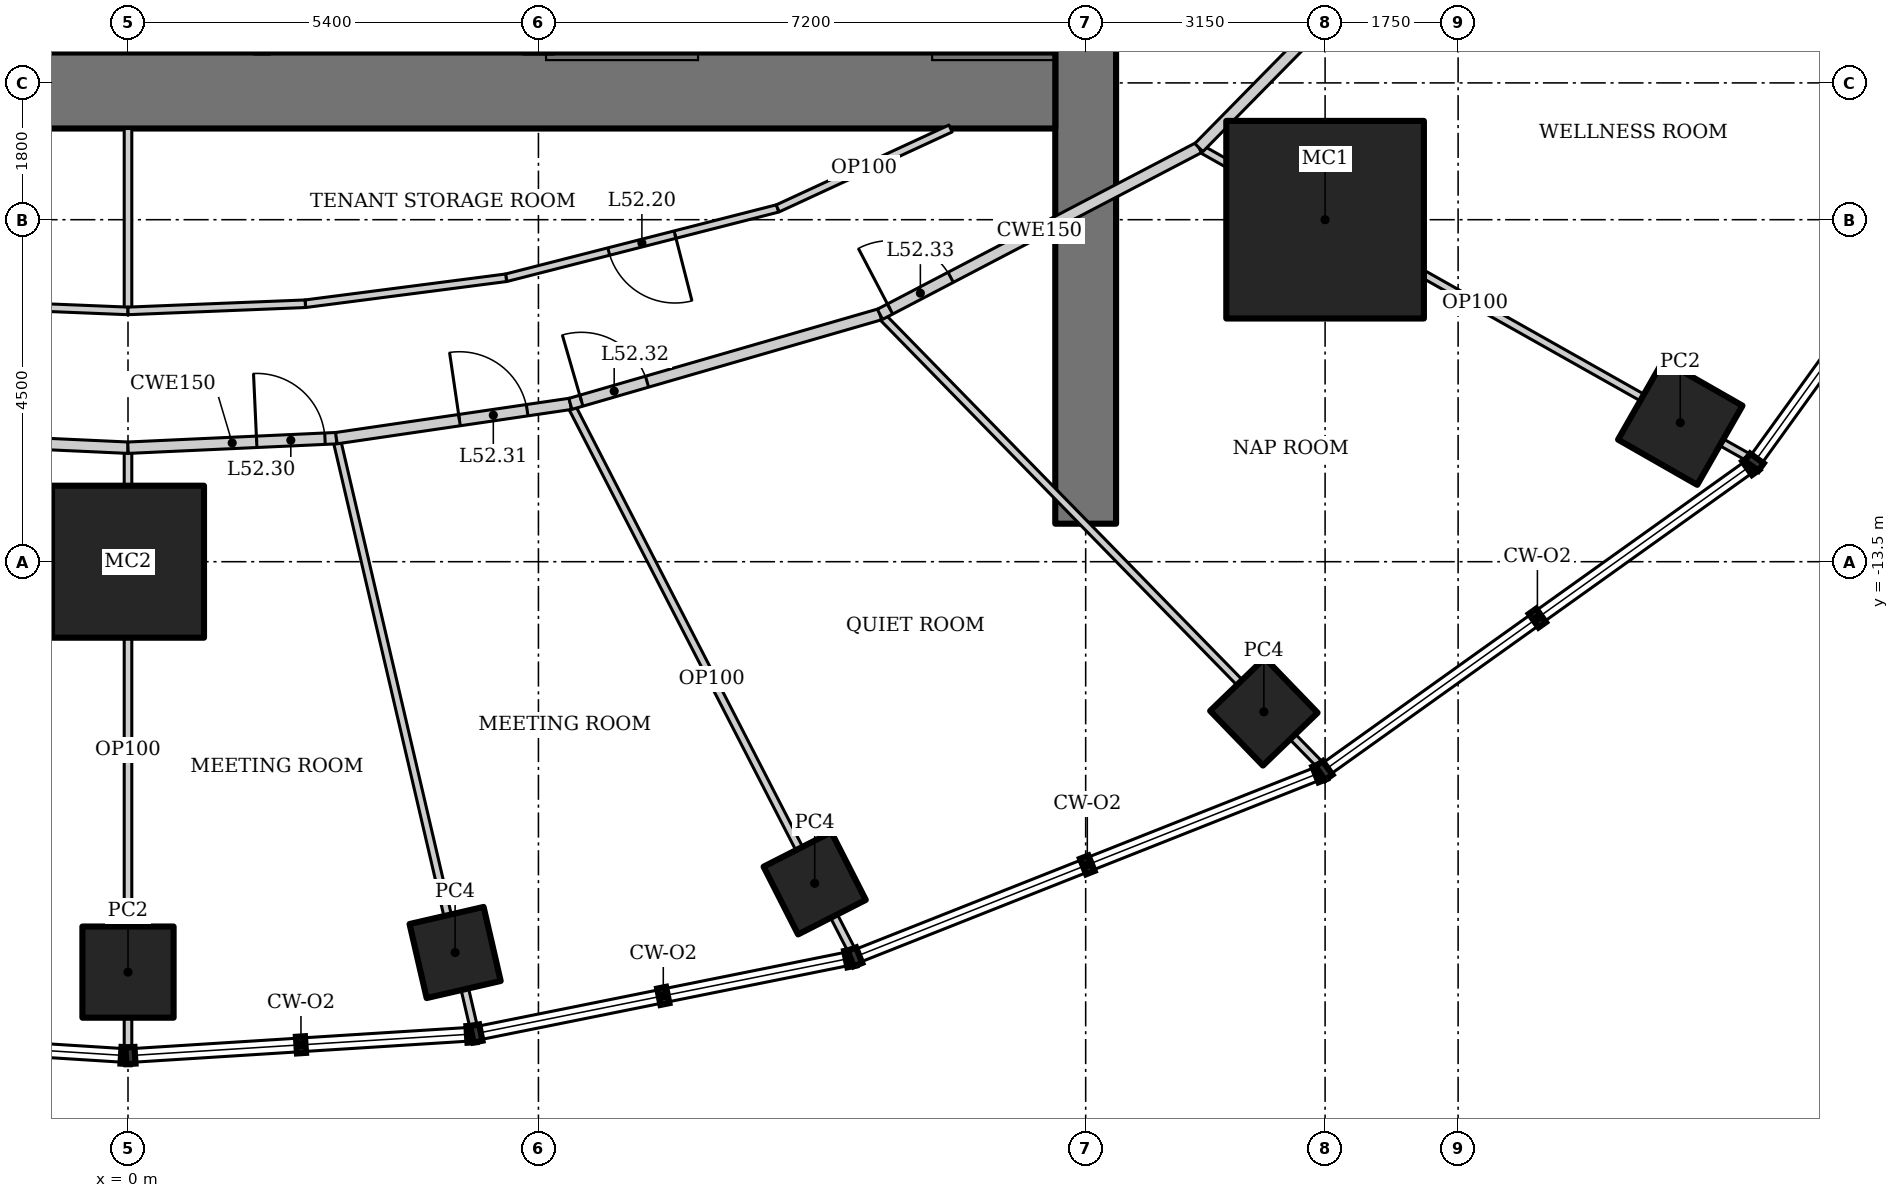
"""IFC4 building model, lengths in metres.
Left out: names, types, materials, properties, quantities, classifications, styles, units other than length and angle.
Written with IfcOpenShell. Run it as: python <this file> out.ifc"""

import sys

from ifc_helpers import new_model, si_unit, direction, frame, frame_2d, origin, origin_2d, place, context, subcontext, project, spatial, rectangle, hollow_rectangle, extrude, element, fill, save


model = new_model("IFC4")
c1 = context("Model", 3, precision=1e-05, world=origin(), true_north=direction((0.0, 1.0)))
c2 = subcontext(c1, "Body", "Model", "MODEL_VIEW")
j1 = project(units=[si_unit("LENGTHUNIT", "METRE"), si_unit("PLANEANGLEUNIT", "RADIAN")], contexts=[c1])
p1 = place(None, origin())
s1 = spatial("IfcSite", under=j1, at=p1, CompositionType="ELEMENT")
p2 = place(p1, origin())
s2 = spatial("IfcBuilding", under=s1, at=p2, CompositionType="ELEMENT")
p3 = place(p2, frame((0.0, 0.0, 224.2)))
s3 = spatial("IfcBuildingStorey", under=s2, at=p3, CompositionType="ELEMENT", Elevation=224.2)
p4 = place(p3, frame((0.0, -13.5, 0.0), z_axis=(0.0, 0.0, 1.0), x_axis=(1.0, 0.0, 0.0)))
e1 = element("IfcColumn", 1, at=p4, inside=s3, PredefinedType="COLUMN", context=c2, shape_type="SweptSolid", body=[
    extrude(hollow_rectangle(XDim=2.0, YDim=2.0, WallThickness=0.17, at=origin_2d()), origin(), (0.0, 0.0, 1.0), 4.2),
])
p5 = place(p3, frame((15.75, -9.0, 0.0), z_axis=(0.0, 0.0, 1.0), x_axis=(1.0, 0.0, 0.0)))
e2 = element("IfcColumn", 2, at=p5, inside=s3, PredefinedType="COLUMN", context=c2, shape_type="SweptSolid", body=[
    extrude(hollow_rectangle(XDim=2.6, YDim=2.6, WallThickness=0.13, at=origin_2d()), origin(), (0.0, 0.0, 1.0), 4.2),
])
p6 = place(p3, frame((0.0, -18.9, 0.0), z_axis=(0.0, 0.0, 1.0), x_axis=(1.0, 0.0, 0.0)))
e3 = element("IfcColumn", 3, at=p6, inside=s3, PredefinedType="COLUMN", context=c2, shape_type="SweptSolid", body=[
    extrude(hollow_rectangle(XDim=1.2, YDim=1.2, WallThickness=0.1, at=origin_2d()), origin(), (0.0, 0.0, 1.0), 4.2),
])
for number, where, z_axis, x_axis in (
    (4, (4.304, -18.642, 0.0), (0.0, 0.0, 1.0), (0.974, 0.225, 0.0)),
    (5, (9.035, -17.731, 0.0), (0.0, 0.0, 1.0), (0.891, 0.454, 0.0)),
    (6, (14.944, -15.475, 0.0), (0.0, 0.0, 1.0), (0.719, 0.695, 0.0)),
):
    element("IfcColumn", number, at=place(p3, frame(where, z_axis=z_axis, x_axis=x_axis)), inside=s3, PredefinedType="COLUMN", context=c2, shape_type="SweptSolid", body=[
        extrude(hollow_rectangle(XDim=1.0, YDim=1.0, WallThickness=0.08, at=origin_2d()), origin(), (0.0, 0.0, 1.0), 4.2),
    ])
p7 = place(p3, frame((20.423, -11.67, 0.0), z_axis=(0.0, 0.0, 1.0), x_axis=(0.496139221777, 0.86824298017, 0.0)))
e7 = element("IfcColumn", 7, at=p7, inside=s3, PredefinedType="COLUMN", context=c2, shape_type="SweptSolid", body=[
    extrude(hollow_rectangle(XDim=1.2, YDim=1.2, WallThickness=0.1, at=origin_2d()), origin(), (0.0, 0.0, 1.0), 4.2),
])
p8 = place(p3, frame((12.6, -13.0, 0.0), z_axis=(0.0, 0.0, 1.0), x_axis=(0.0, 1.0, 0.0)))
e8 = element("IfcWall", 8, at=p8, inside=s3, PredefinedType="SHEAR", context=c2, shape_type="SweptSolid", body=[
    extrude(rectangle(XDim=26.0, YDim=0.8, at=frame_2d((13.0, 0.0))), origin(), (0.0, 0.0, 1.0), 4.2),
])
p9 = place(p8, frame((12.1, 0.0, 0.0)))
e9 = element("IfcOpeningElement", 9, at=p9, cuts=e8, PredefinedType="OPENING", context=c2, shape_type="SweptSolid", body=[
    extrude(rectangle(XDim=1.8, YDim=2.1, at=frame_2d((0.9, 1.05))), frame((0.0, 0.41, 0.0), z_axis=(0.0, -1.0, 0.0), x_axis=(1.0, 0.0, 0.0)), (0.0, 0.0, 1.0), 0.82),
])
p10 = place(p3, frame((-12.2, -7.3, 0.0), z_axis=(0.0, 0.0, 1.0), x_axis=(1.0, 0.0, 0.0)))
e10 = element("IfcWall", 10, at=p10, inside=s3, PredefinedType="SHEAR", context=c2, shape_type="SweptSolid", body=[
    extrude(rectangle(XDim=24.4, YDim=1.0, at=frame_2d((12.2, 0.0))), origin(), (0.0, 0.0, 1.0), 4.2),
])
p11 = place(p3, frame((1.767, -2.6, 0.0), z_axis=(0.0, 0.0, 1.0), x_axis=(0.0, -1.0, 0.0)))
e11 = element("IfcWall", 11, at=p11, inside=s3, PredefinedType="SOLIDWALL", context=c2, shape_type="SweptSolid", body=[
    extrude(rectangle(XDim=4.2, YDim=0.2, at=frame_2d((2.1, 0.0))), origin(), (0.0, 0.0, 1.0), 4.2),
])
p12 = place(p3, frame((0.0, -19.945, 0.0), z_axis=(0.0, 0.0, 1.0), x_axis=(0.0, 1.0, 0.0)))
e12 = element("IfcWall", 12, at=p12, inside=s3, PredefinedType="PARTITIONING", context=c2, shape_type="SweptSolid", body=[
    extrude(rectangle(XDim=7.945, YDim=0.1, at=frame_2d((3.972, 0.0))), origin(), (0.0, 0.0, 1.0), 3.644),
])
p13 = place(p3, frame((4.556, -19.657, 0.0), z_axis=(0.0, 0.0, 1.0), x_axis=(-0.227034513848, 0.973886712879, 0.0)))
e13 = element("IfcWall", 13, at=p13, inside=s3, PredefinedType="PARTITIONING", context=c2, shape_type="SweptSolid", body=[
    extrude(rectangle(XDim=7.991, YDim=0.1, at=frame_2d((3.996, 0.0))), origin(), (0.0, 0.0, 1.0), 3.293),
])
p14 = place(p3, frame((9.539, -18.65, 0.0), z_axis=(0.0, 0.0, 1.0), x_axis=(-0.457552286462, 0.88918271753, 0.0)))
e14 = element("IfcWall", 14, at=p14, inside=s3, PredefinedType="PARTITIONING", context=c2, shape_type="SweptSolid", body=[
    extrude(rectangle(XDim=8.128, YDim=0.1, at=frame_2d((4.064, 0.0))), origin(), (0.0, 0.0, 1.0), 3.293),
])
p15 = place(p3, frame((15.709, -16.199, 0.0), z_axis=(0.0, 0.0, 1.0), x_axis=(-0.69875697861, 0.715359129978, 0.0)))
e15 = element("IfcWall", 15, at=p15, inside=s3, PredefinedType="PARTITIONING", context=c2, shape_type="SweptSolid", body=[
    extrude(rectangle(XDim=8.323, YDim=0.1, at=frame_2d((4.162, 0.0))), origin(), (0.0, 0.0, 1.0), 3.41),
])
p16 = place(p3, frame((21.358, -12.15, 0.0), z_axis=(0.0, 0.0, 1.0), x_axis=(-0.871080529249, 0.491140215786, 0.0)))
e16 = element("IfcWall", 16, at=p16, inside=s3, PredefinedType="PARTITIONING", context=c2, shape_type="SweptSolid", body=[
    extrude(rectangle(XDim=8.345, YDim=0.1, at=frame_2d((4.173, 0.0))), origin(), (0.0, 0.0, 1.0), 3.522),
])
p17 = place(p3, frame((-2.741, -11.875, 0.0), z_axis=(0.0, 0.0, 1.0), x_axis=(0.998953998629, -0.045726454297, 0.0)))
e17 = element("IfcWall", 17, at=p17, inside=s3, PredefinedType="PARTITIONING", context=c2, shape_type="SweptSolid", body=[
    extrude(rectangle(XDim=2.744, YDim=0.15, at=frame_2d((1.372, 0.0))), origin(), (0.0, 0.0, 1.0), 4.05),
])
p18 = place(p3, frame((0.0, -12.0, 0.0), z_axis=(0.0, 0.0, 1.0), x_axis=(0.998953998629, 0.045726454297, 0.0)))
e18 = element("IfcWall", 18, at=p18, inside=s3, PredefinedType="PARTITIONING", context=c2, shape_type="SweptSolid", body=[
    extrude(rectangle(XDim=2.744, YDim=0.15, at=frame_2d((1.372, 0.0))), origin(), (0.0, 0.0, 1.0), 4.05),
])
p19 = place(p18, frame((1.694, 0.0, 0.0)))
e19 = element("IfcOpeningElement", 19, at=p19, cuts=e18, PredefinedType="OPENING", context=c2, shape_type="SweptSolid", body=[
    extrude(rectangle(XDim=0.9, YDim=2.1, at=frame_2d((0.45, 1.05))), frame((0.0, 0.085, 0.0), z_axis=(0.0, -1.0, 0.0), x_axis=(1.0, 0.0, 0.0)), (0.0, 0.0, 1.0), 0.17),
])
p20 = place(p3, frame((2.741, -11.875, 0.0), z_axis=(0.0, 0.0, 1.0), x_axis=(0.989421822189, 0.145067080265, 0.0)))
e20 = element("IfcWall", 20, at=p20, inside=s3, PredefinedType="PARTITIONING", context=c2, shape_type="SweptSolid", body=[
    extrude(rectangle(XDim=3.112, YDim=0.15, at=frame_2d((1.556, 0.0))), origin(), (0.0, 0.0, 1.0), 4.05),
])
p21 = place(p20, frame((1.637, 0.0, 0.0)))
e21 = element("IfcOpeningElement", 21, at=p21, cuts=e20, PredefinedType="OPENING", context=c2, shape_type="SweptSolid", body=[
    extrude(rectangle(XDim=0.9, YDim=2.1, at=frame_2d((0.45, 1.05))), frame((0.0, 0.085, 0.0), z_axis=(0.0, -1.0, 0.0), x_axis=(1.0, 0.0, 0.0)), (0.0, 0.0, 1.0), 0.17),
])
p22 = place(p3, frame((5.82, -11.423, 0.0), z_axis=(0.0, 0.0, 1.0), x_axis=(0.960614838378, 0.27788330696, 0.0)))
e22 = element("IfcWall", 22, at=p22, inside=s3, PredefinedType="PARTITIONING", context=c2, shape_type="SweptSolid", body=[
    extrude(rectangle(XDim=4.24, YDim=0.15, at=frame_2d((2.12, 0.0))), origin(), (0.0, 0.0, 1.0), 4.05),
])
p23 = place(p22, frame((0.15, 0.0, 0.0)))
e23 = element("IfcOpeningElement", 23, at=p23, cuts=e22, PredefinedType="OPENING", context=c2, shape_type="SweptSolid", body=[
    extrude(rectangle(XDim=0.9, YDim=2.1, at=frame_2d((0.45, 1.05))), frame((0.0, 0.085, 0.0), z_axis=(0.0, -1.0, 0.0), x_axis=(1.0, 0.0, 0.0)), (0.0, 0.0, 1.0), 0.17),
])
p24 = place(p3, frame((9.893, -10.245, 0.0), z_axis=(0.0, 0.0, 1.0), x_axis=(0.886174439647, 0.463351769735, 0.0)))
e24 = element("IfcWall", 24, at=p24, inside=s3, PredefinedType="PARTITIONING", context=c2, shape_type="SweptSolid", body=[
    extrude(rectangle(XDim=4.735, YDim=0.15, at=frame_2d((2.367, 0.0))), origin(), (0.0, 0.0, 1.0), 4.05),
])
p25 = place(p24, frame((0.15, 0.0, 0.0)))
e25 = element("IfcOpeningElement", 25, at=p25, cuts=e24, PredefinedType="OPENING", context=c2, shape_type="SweptSolid", body=[
    extrude(rectangle(XDim=0.9, YDim=2.1, at=frame_2d((0.45, 1.05))), frame((0.0, 0.085, 0.0), z_axis=(0.0, -1.0, 0.0), x_axis=(1.0, 0.0, 0.0)), (0.0, 0.0, 1.0), 0.17),
])
p26 = place(p3, frame((14.089, -8.051, 0.0), z_axis=(0.0, 0.0, 1.0), x_axis=(0.701111216625, 0.713051934941, 0.0)))
e26 = element("IfcWall", 26, at=p26, inside=s3, PredefinedType="PARTITIONING", context=c2, shape_type="SweptSolid", body=[
    extrude(rectangle(XDim=5.112, YDim=0.15, at=frame_2d((2.556, 0.0))), origin(), (0.0, 0.0, 1.0), 4.05),
])
p27 = place(p26, frame((4.061, 0.0, 0.0)))
e27 = element("IfcOpeningElement", 27, at=p27, cuts=e26, PredefinedType="OPENING", context=c2, shape_type="SweptSolid", body=[
    extrude(rectangle(XDim=0.9, YDim=2.1, at=frame_2d((0.45, 1.05))), frame((0.0, 0.085, 0.0), z_axis=(0.0, -1.0, 0.0), x_axis=(1.0, 0.0, 0.0)), (0.0, 0.0, 1.0), 0.17),
])
p28 = place(p3, frame((0.0, -7.8, 0.0), z_axis=(0.0, 0.0, 1.0), x_axis=(0.0, -1.0, 0.0)))
e28 = element("IfcWall", 28, at=p28, inside=s3, PredefinedType="PARTITIONING", context=c2, shape_type="SweptSolid", body=[
    extrude(rectangle(XDim=2.4, YDim=0.1, at=frame_2d((1.2, 0.0))), origin(), (0.0, 0.0, 1.0), 3.644),
])
p29 = place(p3, frame((0.0, -10.2, 0.0), z_axis=(0.0, 0.0, 1.0), x_axis=(-0.999185180766, 0.040360556695, 0.0)))
e29 = element("IfcWall", 29, at=p29, inside=s3, PredefinedType="PARTITIONING", context=c2, shape_type="SweptSolid", body=[
    extrude(rectangle(XDim=2.335, YDim=0.1, at=frame_2d((1.167, 0.0))), origin(), (0.0, 0.0, 1.0), 4.05),
])
p30 = place(p3, frame((8.548, -8.851, 0.0), z_axis=(0.0, 0.0, 1.0), x_axis=(-0.968887312542, -0.247502273921, 0.0)))
e30 = element("IfcWall", 30, at=p30, inside=s3, PredefinedType="PARTITIONING", context=c2, shape_type="SweptSolid", body=[
    extrude(rectangle(XDim=3.687, YDim=0.1, at=frame_2d((1.844, 0.0))), origin(), (0.0, 0.0, 1.0), 4.05),
])
p31 = place(p30, frame((1.394, 0.0, 0.0)))
e31 = element("IfcOpeningElement", 31, at=p31, cuts=e30, PredefinedType="OPENING", context=c2, shape_type="SweptSolid", body=[
    extrude(rectangle(XDim=0.9, YDim=2.1, at=frame_2d((0.45, 1.05))), frame((0.0, 0.06, 0.0), z_axis=(0.0, -1.0, 0.0), x_axis=(1.0, 0.0, 0.0)), (0.0, 0.0, 1.0), 0.12),
])
p32 = place(p3, frame((4.975, -9.764, 0.0), z_axis=(0.0, 0.0, 1.0), x_axis=(-0.99173579163, -0.128296997624, 0.0)))
e32 = element("IfcWall", 32, at=p32, inside=s3, PredefinedType="PARTITIONING", context=c2, shape_type="SweptSolid", body=[
    extrude(rectangle(XDim=2.664, YDim=0.1, at=frame_2d((1.332, 0.0))), origin(), (0.0, 0.0, 1.0), 4.05),
])
p33 = place(p3, frame((2.333, -10.106, 0.0), z_axis=(0.0, 0.0, 1.0), x_axis=(-0.999185180766, -0.040360556695, 0.0)))
e33 = element("IfcWall", 33, at=p33, inside=s3, PredefinedType="PARTITIONING", context=c2, shape_type="SweptSolid", body=[
    extrude(rectangle(XDim=2.335, YDim=0.1, at=frame_2d((1.167, 0.0))), origin(), (0.0, 0.0, 1.0), 4.05),
])
p34 = place(p3, frame((10.823, -7.8, 0.0), z_axis=(0.0, 0.0, 1.0), x_axis=(-0.907759689292, -0.419490579748, 0.0)))
e34 = element("IfcWall", 34, at=p34, inside=s3, PredefinedType="PARTITIONING", context=c2, shape_type="SweptSolid", body=[
    extrude(rectangle(XDim=2.506, YDim=0.1, at=frame_2d((1.253, 0.0))), origin(), (0.0, 0.0, 1.0), 4.05),
])
p35 = place(p31, origin())
e35 = element("IfcDoor", 35, at=p35, inside=s3, OperationType="SINGLE_SWING_LEFT", PredefinedType="DOOR", context=c2, shape_type="SweptSolid", body=[
    extrude(rectangle(XDim=0.9, YDim=2.1, at=frame_2d((0.45, 1.05))), frame((0.0, 0.025, 0.0), z_axis=(0.0, -1.0, 0.0), x_axis=(1.0, 0.0, 0.0)), (0.0, 0.0, 1.0), 0.05),
])
fill(e31, e35)
p36 = place(p19, origin())
e36 = element("IfcDoor", 36, at=p36, inside=s3, OperationType="SINGLE_SWING_LEFT", PredefinedType="DOOR", context=c2, shape_type="SweptSolid", body=[
    extrude(rectangle(XDim=0.9, YDim=2.1, at=frame_2d((0.45, 1.05))), frame((0.0, 0.025, 0.0), z_axis=(0.0, -1.0, 0.0), x_axis=(1.0, 0.0, 0.0)), (0.0, 0.0, 1.0), 0.05),
])
fill(e19, e36)
p37 = place(p21, origin())
e37 = element("IfcDoor", 37, at=p37, inside=s3, OperationType="SINGLE_SWING_LEFT", PredefinedType="DOOR", context=c2, shape_type="SweptSolid", body=[
    extrude(rectangle(XDim=0.9, YDim=2.1, at=frame_2d((0.45, 1.05))), frame((0.0, 0.025, 0.0), z_axis=(0.0, -1.0, 0.0), x_axis=(1.0, 0.0, 0.0)), (0.0, 0.0, 1.0), 0.05),
])
fill(e21, e37)
p38 = place(p23, origin())
e38 = element("IfcDoor", 38, at=p38, inside=s3, OperationType="SINGLE_SWING_LEFT", PredefinedType="DOOR", context=c2, shape_type="SweptSolid", body=[
    extrude(rectangle(XDim=0.9, YDim=2.1, at=frame_2d((0.45, 1.05))), frame((0.0, 0.025, 0.0), z_axis=(0.0, -1.0, 0.0), x_axis=(1.0, 0.0, 0.0)), (0.0, 0.0, 1.0), 0.05),
])
fill(e23, e38)
p39 = place(p25, origin())
e39 = element("IfcDoor", 39, at=p39, inside=s3, OperationType="SINGLE_SWING_LEFT", PredefinedType="DOOR", context=c2, shape_type="SweptSolid", body=[
    extrude(rectangle(XDim=0.9, YDim=2.1, at=frame_2d((0.45, 1.05))), frame((0.0, 0.025, 0.0), z_axis=(0.0, -1.0, 0.0), x_axis=(1.0, 0.0, 0.0)), (0.0, 0.0, 1.0), 0.05),
])
fill(e25, e39)
save(model, sys.argv[1])
